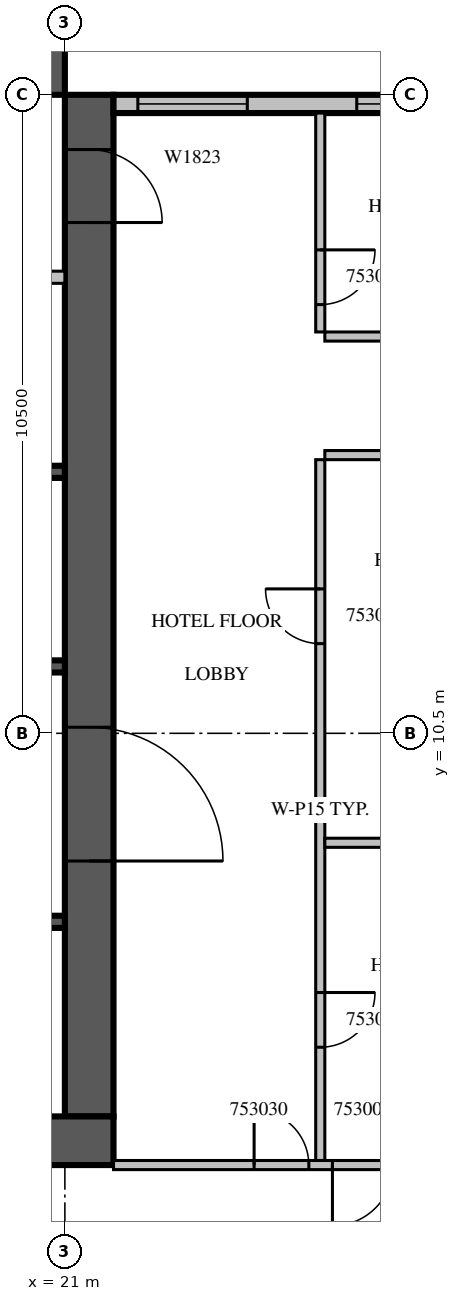
"""IFC4 building model, lengths in metres.
Left out: names, types, materials, properties, quantities, classifications, styles, units other than length and angle.
Written with IfcOpenShell. Run it as: python <this file> out.ifc"""

import sys

from ifc_helpers import new_model, si_unit, direction, frame, frame_2d, origin, place, context, subcontext, project, spatial, rectangle, extrude, source, transform, mapped, element, fill, save


model = new_model("IFC4")
c1 = context("Model", 3, precision=1e-05, world=origin(), true_north=direction((0.0, 1.0)))
c2 = subcontext(c1, "Body", "Model", "MODEL_VIEW")
j1 = project(units=[si_unit("LENGTHUNIT", "METRE"), si_unit("PLANEANGLEUNIT", "RADIAN")], contexts=[c1])
p1 = place(None, origin())
s1 = spatial("IfcSite", under=j1, at=p1, CompositionType="ELEMENT")
p2 = place(p1, origin())
s2 = spatial("IfcBuilding", under=s1, at=p2, CompositionType="ELEMENT")
p3 = place(p2, frame((0.0, 0.0, 234.8)))
s3 = spatial("IfcBuildingStorey", under=s2, at=p3, CompositionType="ELEMENT", Elevation=234.8)
m1 = source(origin(), c2, "Body", "SweptSolid", [
    extrude(rectangle(XDim=16.8, YDim=0.8, at=frame_2d((8.4, 0.0))), origin(), (0.0, 0.0, 1.0), 3.8),
])
p4 = place(p3, frame((21.4, 4.2, 0.0), z_axis=(0.0, 0.0, 1.0), x_axis=(0.0, 1.0, 0.0)))
e1 = element("IfcWall", 1, at=p4, inside=s3, PredefinedType="SHEAR", context=c2, shape_type="MappedRepresentation", body=[
    mapped(m1, transform((0.0, 0.0, 0.0), scale=1.0)),
])
m2 = source(origin(), c2, "Body", "SweptSolid", [
    extrude(rectangle(XDim=2.2, YDim=2.1, at=frame_2d((1.1, 1.05))), frame((0.0, 0.41, 0.0), z_axis=(0.0, -1.0, 0.0), x_axis=(1.0, 0.0, 0.0)), (0.0, 0.0, 1.0), 0.82),
])
p5 = place(p4, frame((4.2, 0.0, 0.0)))
e2 = element("IfcOpeningElement", 2, at=p5, cuts=e1, PredefinedType="OPENING", context=c2, shape_type="MappedRepresentation", body=[
    mapped(m2, transform((0.0, 0.0, 0.0), scale=1.0)),
])
m3 = source(origin(), c2, "Body", "SweptSolid", [
    extrude(rectangle(XDim=1.2, YDim=2.1, at=frame_2d((0.6, 1.05))), frame((0.0, 0.41, 0.0), z_axis=(0.0, -1.0, 0.0), x_axis=(1.0, 0.0, 0.0)), (0.0, 0.0, 1.0), 0.82),
])
p6 = place(p4, frame((14.7, 0.0, 0.0)))
e3 = element("IfcOpeningElement", 3, at=p6, cuts=e1, PredefinedType="OPENING", context=c2, shape_type="MappedRepresentation", body=[
    mapped(m3, transform((0.0, 0.0, 0.0), scale=1.0)),
])
m4 = source(origin(), c2, "Body", "SweptSolid", [
    extrude(rectangle(XDim=17.6, YDim=0.8, at=frame_2d((8.8, 0.0))), origin(), (0.0, 0.0, 1.0), 3.8),
])
p7 = place(p3, frame((4.2, 3.8, 0.0), z_axis=(0.0, 0.0, 1.0), x_axis=(1.0, 0.0, 0.0)))
e4 = element("IfcWall", 4, at=p7, inside=s3, PredefinedType="SHEAR", context=c2, shape_type="MappedRepresentation", body=[
    mapped(m4, transform((0.0, 0.0, 0.0), scale=1.0)),
])
m5 = source(origin(), c2, "Body", "SweptSolid", [
    extrude(rectangle(XDim=0.9, YDim=2.1, at=frame_2d((0.45, 1.05))), frame((0.0, 0.41, 0.0), z_axis=(0.0, -1.0, 0.0), x_axis=(1.0, 0.0, 0.0)), (0.0, 0.0, 1.0), 0.82),
])
p8 = place(p7, frame((11.55, 0.0, 0.0)))
e5 = element("IfcOpeningElement", 5, at=p8, cuts=e4, PredefinedType="OPENING", context=c2, shape_type="MappedRepresentation", body=[
    mapped(m5, transform((0.0, 0.0, 0.0), scale=1.0)),
])
p9 = place(p3, frame((4.2, 21.4, 0.0), z_axis=(0.0, 0.0, 1.0), x_axis=(1.0, 0.0, 0.0)))
e6 = element("IfcWall", 6, at=p9, inside=s3, PredefinedType="SHEAR", context=c2, shape_type="MappedRepresentation", body=[
    mapped(m1, transform((0.0, 0.0, 0.0), scale=1.0)),
])
p10 = place(p9, frame((7.4, 0.0, 0.0)))
e7 = element("IfcOpeningElement", 7, at=p10, cuts=e6, PredefinedType="OPENING", context=c2, shape_type="MappedRepresentation", body=[
    mapped(m3, transform((0.0, 0.0, 0.0), scale=1.0)),
])
m6 = source(origin(), c2, "Body", "SweptSolid", [
    extrude(rectangle(XDim=7.2, YDim=0.3, at=frame_2d((3.6, 0.0))), origin(), (0.0, 0.0, 1.0), 3.4),
])
p11 = place(p3, frame((29.0, 20.85, 0.0), z_axis=(0.0, 0.0, 1.0), x_axis=(-1.0, 0.0, 0.0)))
e8 = element("IfcWall", 8, at=p11, inside=s3, PredefinedType="STANDARD", context=c2, shape_type="MappedRepresentation", body=[
    mapped(m6, transform((0.0, 0.0, 0.0), scale=1.0)),
])
m7 = source(origin(), c2, "Body", "SweptSolid", [
    extrude(rectangle(XDim=3.0, YDim=2.3, at=frame_2d((1.5, 1.15))), frame((0.0, 0.16, 0.0), z_axis=(0.0, -1.0, 0.0), x_axis=(1.0, 0.0, 0.0)), (0.0, 0.0, 1.0), 0.32),
])
p12 = place(p11, frame((0.2, 0.0, 0.6)))
e9 = element("IfcOpeningElement", 9, at=p12, cuts=e8, PredefinedType="OPENING", context=c2, shape_type="MappedRepresentation", body=[
    mapped(m7, transform((0.0, 0.0, 0.0), scale=1.0)),
])
m8 = source(origin(), c2, "Body", "SweptSolid", [
    extrude(rectangle(XDim=1.8, YDim=2.3, at=frame_2d((0.9, 1.15))), frame((0.0, 0.16, 0.0), z_axis=(0.0, -1.0, 0.0), x_axis=(1.0, 0.0, 0.0)), (0.0, 0.0, 1.0), 0.32),
])
p13 = place(p11, frame((5.0, 0.0, 0.6)))
e10 = element("IfcOpeningElement", 10, at=p13, cuts=e8, PredefinedType="OPENING", context=c2, shape_type="MappedRepresentation", body=[
    mapped(m8, transform((0.0, 0.0, 0.0), scale=1.0)),
])
m9 = source(origin(), c2, "Body", "SweptSolid", [
    extrude(rectangle(XDim=2.4, YDim=0.2, at=frame_2d((1.2, 0.0))), origin(), (0.0, 0.0, 1.0), 3.8),
])
p14 = place(p3, frame((18.6, 7.4, 0.0), z_axis=(0.0, 0.0, 1.0), x_axis=(1.0, 0.0, 0.0)))
e11 = element("IfcWall", 11, at=p14, inside=s3, PredefinedType="SOLIDWALL", context=c2, shape_type="MappedRepresentation", body=[
    mapped(m9, transform((0.0, 0.0, 0.0), scale=1.0)),
])
m10 = source(origin(), c2, "Body", "SweptSolid", [
    extrude(rectangle(XDim=9.6, YDim=0.2, at=frame_2d((4.8, 0.0))), origin(), (0.0, 0.0, 1.0), 3.8),
])
p15 = place(p3, frame((11.4, 11.6, 0.0), z_axis=(0.0, 0.0, 1.0), x_axis=(1.0, 0.0, 0.0)))
e12 = element("IfcWall", 12, at=p15, inside=s3, PredefinedType="SOLIDWALL", context=c2, shape_type="MappedRepresentation", body=[
    mapped(m10, transform((0.0, 0.0, 0.0), scale=1.0)),
])
p16 = place(p3, frame((11.4, 14.8, 0.0), z_axis=(0.0, 0.0, 1.0), x_axis=(1.0, 0.0, 0.0)))
e13 = element("IfcWall", 13, at=p16, inside=s3, PredefinedType="SOLIDWALL", context=c2, shape_type="MappedRepresentation", body=[
    mapped(m10, transform((0.0, 0.0, 0.0), scale=1.0)),
])
m11 = source(origin(), c2, "Body", "SweptSolid", [
    extrude(rectangle(XDim=1.1, YDim=2.1, at=frame_2d((0.55, 1.05))), frame((0.0, 0.11, 0.0), z_axis=(0.0, -1.0, 0.0), x_axis=(1.0, 0.0, 0.0)), (0.0, 0.0, 1.0), 0.22),
])
p17 = place(p16, frame((3.05, 0.0, 0.0)))
e14 = element("IfcOpeningElement", 14, at=p17, cuts=e13, PredefinedType="OPENING", context=c2, shape_type="MappedRepresentation", body=[
    mapped(m11, transform((0.0, 0.0, 0.0), scale=1.0)),
])
p18 = place(p16, frame((5.45, 0.0, 0.0)))
e15 = element("IfcOpeningElement", 15, at=p18, cuts=e13, PredefinedType="OPENING", context=c2, shape_type="MappedRepresentation", body=[
    mapped(m11, transform((0.0, 0.0, 0.0), scale=1.0)),
])
p19 = place(p16, frame((7.85, 0.0, 0.0)))
e16 = element("IfcOpeningElement", 16, at=p19, cuts=e13, PredefinedType="OPENING", context=c2, shape_type="MappedRepresentation", body=[
    mapped(m11, transform((0.0, 0.0, 0.0), scale=1.0)),
])
m12 = source(origin(), c2, "Body", "SweptSolid", [
    extrude(rectangle(XDim=11.45, YDim=0.2, at=frame_2d((5.725, 0.0))), origin(), (0.0, 0.0, 1.0), 3.4),
])
p20 = place(p3, frame((9.55, 18.0, 0.0), z_axis=(0.0, 0.0, 1.0), x_axis=(1.0, 0.0, 0.0)))
e17 = element("IfcWall", 17, at=p20, inside=s3, PredefinedType="PARTITIONING", context=c2, shape_type="MappedRepresentation", body=[
    mapped(m12, transform((0.0, 0.0, 0.0), scale=1.0)),
])
m13 = source(origin(), c2, "Body", "SweptSolid", [
    extrude(rectangle(XDim=0.9, YDim=2.1, at=frame_2d((0.45, 1.05))), frame((0.0, 0.11, 0.0), z_axis=(0.0, -1.0, 0.0), x_axis=(1.0, 0.0, 0.0)), (0.0, 0.0, 1.0), 0.22),
])
p21 = place(p20, frame((1.075, 0.0, 0.0)))
e18 = element("IfcOpeningElement", 18, at=p21, cuts=e17, PredefinedType="OPENING", context=c2, shape_type="MappedRepresentation", body=[
    mapped(m13, transform((0.0, 0.0, 0.0), scale=1.0)),
])
p22 = place(p20, frame((3.125, 0.0, 0.0)))
e19 = element("IfcOpeningElement", 19, at=p22, cuts=e17, PredefinedType="OPENING", context=c2, shape_type="MappedRepresentation", body=[
    mapped(m13, transform((0.0, 0.0, 0.0), scale=1.0)),
])
p23 = place(p20, frame((7.35, 0.0, 0.0)))
e20 = element("IfcOpeningElement", 20, at=p23, cuts=e17, PredefinedType="OPENING", context=c2, shape_type="MappedRepresentation", body=[
    mapped(m11, transform((0.0, 0.0, 0.0), scale=1.0)),
])
m14 = source(origin(), c2, "Body", "SweptSolid", [
    extrude(rectangle(XDim=11.525, YDim=0.15, at=frame_2d((5.763, 0.0))), origin(), (0.0, 0.0, 1.0), 3.4),
])
p24 = place(p3, frame((25.2, 15.0, 0.0), z_axis=(0.0, 0.0, 1.0), x_axis=(0.0, -1.0, 0.0)))
e21 = element("IfcWall", 21, at=p24, inside=s3, PredefinedType="PARTITIONING", context=c2, shape_type="MappedRepresentation", body=[
    mapped(m14, transform((0.0, 0.0, 0.0), scale=1.0)),
])
m15 = source(origin(), c2, "Body", "SweptSolid", [
    extrude(rectangle(XDim=0.9, YDim=2.1, at=frame_2d((0.45, 1.05))), frame((0.0, 0.085, 0.0), z_axis=(0.0, -1.0, 0.0), x_axis=(1.0, 0.0, 0.0)), (0.0, 0.0, 1.0), 0.17),
])
p25 = place(p24, frame((8.762, 0.0, 0.0)))
e22 = element("IfcOpeningElement", 22, at=p25, cuts=e21, PredefinedType="OPENING", context=c2, shape_type="MappedRepresentation", body=[
    mapped(m15, transform((0.0, 0.0, 0.0), scale=1.0)),
])
p26 = place(p24, frame((2.125, 0.0, 0.0)))
e23 = element("IfcOpeningElement", 23, at=p26, cuts=e21, PredefinedType="OPENING", context=c2, shape_type="MappedRepresentation", body=[
    mapped(m15, transform((0.0, 0.0, 0.0), scale=1.0)),
])
m16 = source(origin(), c2, "Body", "SweptSolid", [
    extrude(rectangle(XDim=3.6, YDim=0.15, at=frame_2d((1.8, 0.0))), origin(), (0.0, 0.0, 1.0), 3.4),
])
p27 = place(p3, frame((25.2, 20.7, 0.0), z_axis=(0.0, 0.0, 1.0), x_axis=(0.0, -1.0, 0.0)))
e24 = element("IfcWall", 24, at=p27, inside=s3, PredefinedType="PARTITIONING", context=c2, shape_type="MappedRepresentation", body=[
    mapped(m16, transform((0.0, 0.0, 0.0), scale=1.0)),
])
p28 = place(p27, frame((2.25, 0.0, 0.0)))
e25 = element("IfcOpeningElement", 25, at=p28, cuts=e24, PredefinedType="OPENING", context=c2, shape_type="MappedRepresentation", body=[
    mapped(m15, transform((0.0, 0.0, 0.0), scale=1.0)),
])
m17 = source(origin(), c2, "Body", "SweptSolid", [
    extrude(rectangle(XDim=4.05, YDim=0.15, at=frame_2d((2.025, 0.0))), origin(), (0.0, 0.0, 1.0), 3.4),
])
for number, where, z_axis, x_axis in (
    (26, (29.325, 8.7, 0.0), (0.0, 0.0, 1.0), (-1.0, 0.0, 0.0)),
    (27, (29.325, 15.075, 0.0), (0.0, 0.0, 1.0), (-1.0, 0.0, 0.0)),
    (28, (25.275, 17.025, 0.0), (0.0, 0.0, 1.0), (1.0, 0.0, 0.0)),
):
    element("IfcWall", number, at=place(p3, frame(where, z_axis=z_axis, x_axis=x_axis)), inside=s3, PredefinedType="PARTITIONING", context=c2, shape_type="MappedRepresentation", body=[
        mapped(m17, transform((0.0, 0.0, 0.0), scale=1.0)),
    ])
m18 = source(origin(), c2, "Body", "SweptSolid", [
    extrude(rectangle(XDim=7.525, YDim=0.15, at=frame_2d((3.763, 0.0))), origin(), (0.0, 0.0, 1.0), 3.4),
])
p29 = place(p3, frame((21.8, 3.4, 0.0), z_axis=(0.0, 0.0, 1.0), x_axis=(1.0, 0.0, 0.0)))
e29 = element("IfcWall", 29, at=p29, inside=s3, PredefinedType="PARTITIONING", context=c2, shape_type="MappedRepresentation", body=[
    mapped(m18, transform((0.0, 0.0, 0.0), scale=1.0)),
])
m19 = source(origin(), c2, "Body", "SweptSolid", [
    extrude(rectangle(XDim=1.0, YDim=2.1, at=frame_2d((0.5, 1.05))), frame((0.0, 0.085, 0.0), z_axis=(0.0, -1.0, 0.0), x_axis=(1.0, 0.0, 0.0)), (0.0, 0.0, 1.0), 0.17),
])
p30 = place(p29, frame((3.6, 0.0, 0.0)))
e30 = element("IfcOpeningElement", 30, at=p30, cuts=e29, PredefinedType="OPENING", context=c2, shape_type="MappedRepresentation", body=[
    mapped(m19, transform((0.0, 0.0, 0.0), scale=1.0)),
])
p31 = place(p29, frame((2.312, 0.0, 0.0)))
e31 = element("IfcOpeningElement", 31, at=p31, cuts=e29, PredefinedType="OPENING", context=c2, shape_type="MappedRepresentation", body=[
    mapped(m15, transform((0.0, 0.0, 0.0), scale=1.0)),
])
m20 = source(origin(), c2, "Body", "SweptSolid", [
    extrude(rectangle(XDim=3.0, YDim=2.3, at=frame_2d((1.5, 1.15))), frame((0.0, 0.03, 0.0), z_axis=(0.0, -1.0, 0.0), x_axis=(1.0, 0.0, 0.0)), (0.0, 0.0, 1.0), 0.06),
])
p32 = place(p12, origin())
e32 = element("IfcWindow", 32, at=p32, inside=s3, PartitioningType="SINGLE_PANEL", PredefinedType="WINDOW", context=c2, shape_type="MappedRepresentation", body=[
    mapped(m20, transform((0.0, 0.0, 0.0), scale=1.0)),
])
fill(e9, e32)
m21 = source(origin(), c2, "Body", "SweptSolid", [
    extrude(rectangle(XDim=1.8, YDim=2.3, at=frame_2d((0.9, 1.15))), frame((0.0, 0.03, 0.0), z_axis=(0.0, -1.0, 0.0), x_axis=(1.0, 0.0, 0.0)), (0.0, 0.0, 1.0), 0.06),
])
p33 = place(p13, origin())
e33 = element("IfcWindow", 33, at=p33, inside=s3, PartitioningType="SINGLE_PANEL", PredefinedType="WINDOW", context=c2, shape_type="MappedRepresentation", body=[
    mapped(m21, transform((0.0, 0.0, 0.0), scale=1.0)),
])
fill(e10, e33)
m22 = source(origin(), c2, "Body", "SweptSolid", [
    extrude(rectangle(XDim=2.2, YDim=2.1, at=frame_2d((1.1, 1.05))), frame((0.0, 0.025, 0.0), z_axis=(0.0, -1.0, 0.0), x_axis=(1.0, 0.0, 0.0)), (0.0, 0.0, 1.0), 0.05),
])
p34 = place(p5, origin())
e34 = element("IfcDoor", 34, at=p34, inside=s3, OperationType="DOUBLE_DOOR_SINGLE_SWING", PredefinedType="DOOR", context=c2, shape_type="MappedRepresentation", body=[
    mapped(m22, transform((0.0, 0.0, 0.0), scale=1.0)),
])
fill(e2, e34)
m23 = source(origin(), c2, "Body", "SweptSolid", [
    extrude(rectangle(XDim=1.2, YDim=2.1, at=frame_2d((0.6, 1.05))), frame((0.0, 0.025, 0.0), z_axis=(0.0, -1.0, 0.0), x_axis=(1.0, 0.0, 0.0)), (0.0, 0.0, 1.0), 0.05),
])
p35 = place(p6, origin())
e35 = element("IfcDoor", 35, at=p35, inside=s3, OperationType="SINGLE_SWING_RIGHT", PredefinedType="DOOR", context=c2, shape_type="MappedRepresentation", body=[
    mapped(m23, transform((0.0, 0.0, 0.0), scale=1.0)),
])
fill(e3, e35)
m24 = source(origin(), c2, "Body", "SweptSolid", [
    extrude(rectangle(XDim=0.9, YDim=2.1, at=frame_2d((0.45, 1.05))), frame((0.0, 0.025, 0.0), z_axis=(0.0, -1.0, 0.0), x_axis=(1.0, 0.0, 0.0)), (0.0, 0.0, 1.0), 0.05),
])
p36 = place(p25, origin())
e36 = element("IfcDoor", 36, at=p36, inside=s3, OperationType="SINGLE_SWING_LEFT", PredefinedType="DOOR", context=c2, shape_type="MappedRepresentation", body=[
    mapped(m24, transform((0.0, 0.0, 0.0), scale=1.0)),
])
fill(e22, e36)
p37 = place(p26, origin())
e37 = element("IfcDoor", 37, at=p37, inside=s3, OperationType="SINGLE_SWING_RIGHT", PredefinedType="DOOR", context=c2, shape_type="MappedRepresentation", body=[
    mapped(m24, transform((0.0, 0.0, 0.0), scale=1.0)),
])
fill(e23, e37)
p38 = place(p28, origin())
e38 = element("IfcDoor", 38, at=p38, inside=s3, OperationType="SINGLE_SWING_LEFT", PredefinedType="DOOR", context=c2, shape_type="MappedRepresentation", body=[
    mapped(m24, transform((0.0, 0.0, 0.0), scale=1.0)),
])
fill(e25, e38)
m25 = source(origin(), c2, "Body", "SweptSolid", [
    extrude(rectangle(XDim=1.0, YDim=2.1, at=frame_2d((0.5, 1.05))), frame((0.0, 0.025, 0.0), z_axis=(0.0, -1.0, 0.0), x_axis=(1.0, 0.0, 0.0)), (0.0, 0.0, 1.0), 0.05),
])
p39 = place(p30, origin())
e39 = element("IfcDoor", 39, at=p39, inside=s3, OperationType="SINGLE_SWING_RIGHT", PredefinedType="DOOR", context=c2, shape_type="MappedRepresentation", body=[
    mapped(m25, transform((0.0, 0.0, 0.0), scale=1.0)),
])
fill(e30, e39)
p40 = place(p31, origin())
e40 = element("IfcDoor", 40, at=p40, inside=s3, OperationType="SINGLE_SWING_LEFT", PredefinedType="DOOR", context=c2, shape_type="MappedRepresentation", body=[
    mapped(m24, transform((0.0, 0.0, 0.0), scale=1.0)),
])
fill(e31, e40)
save(model, sys.argv[1])
